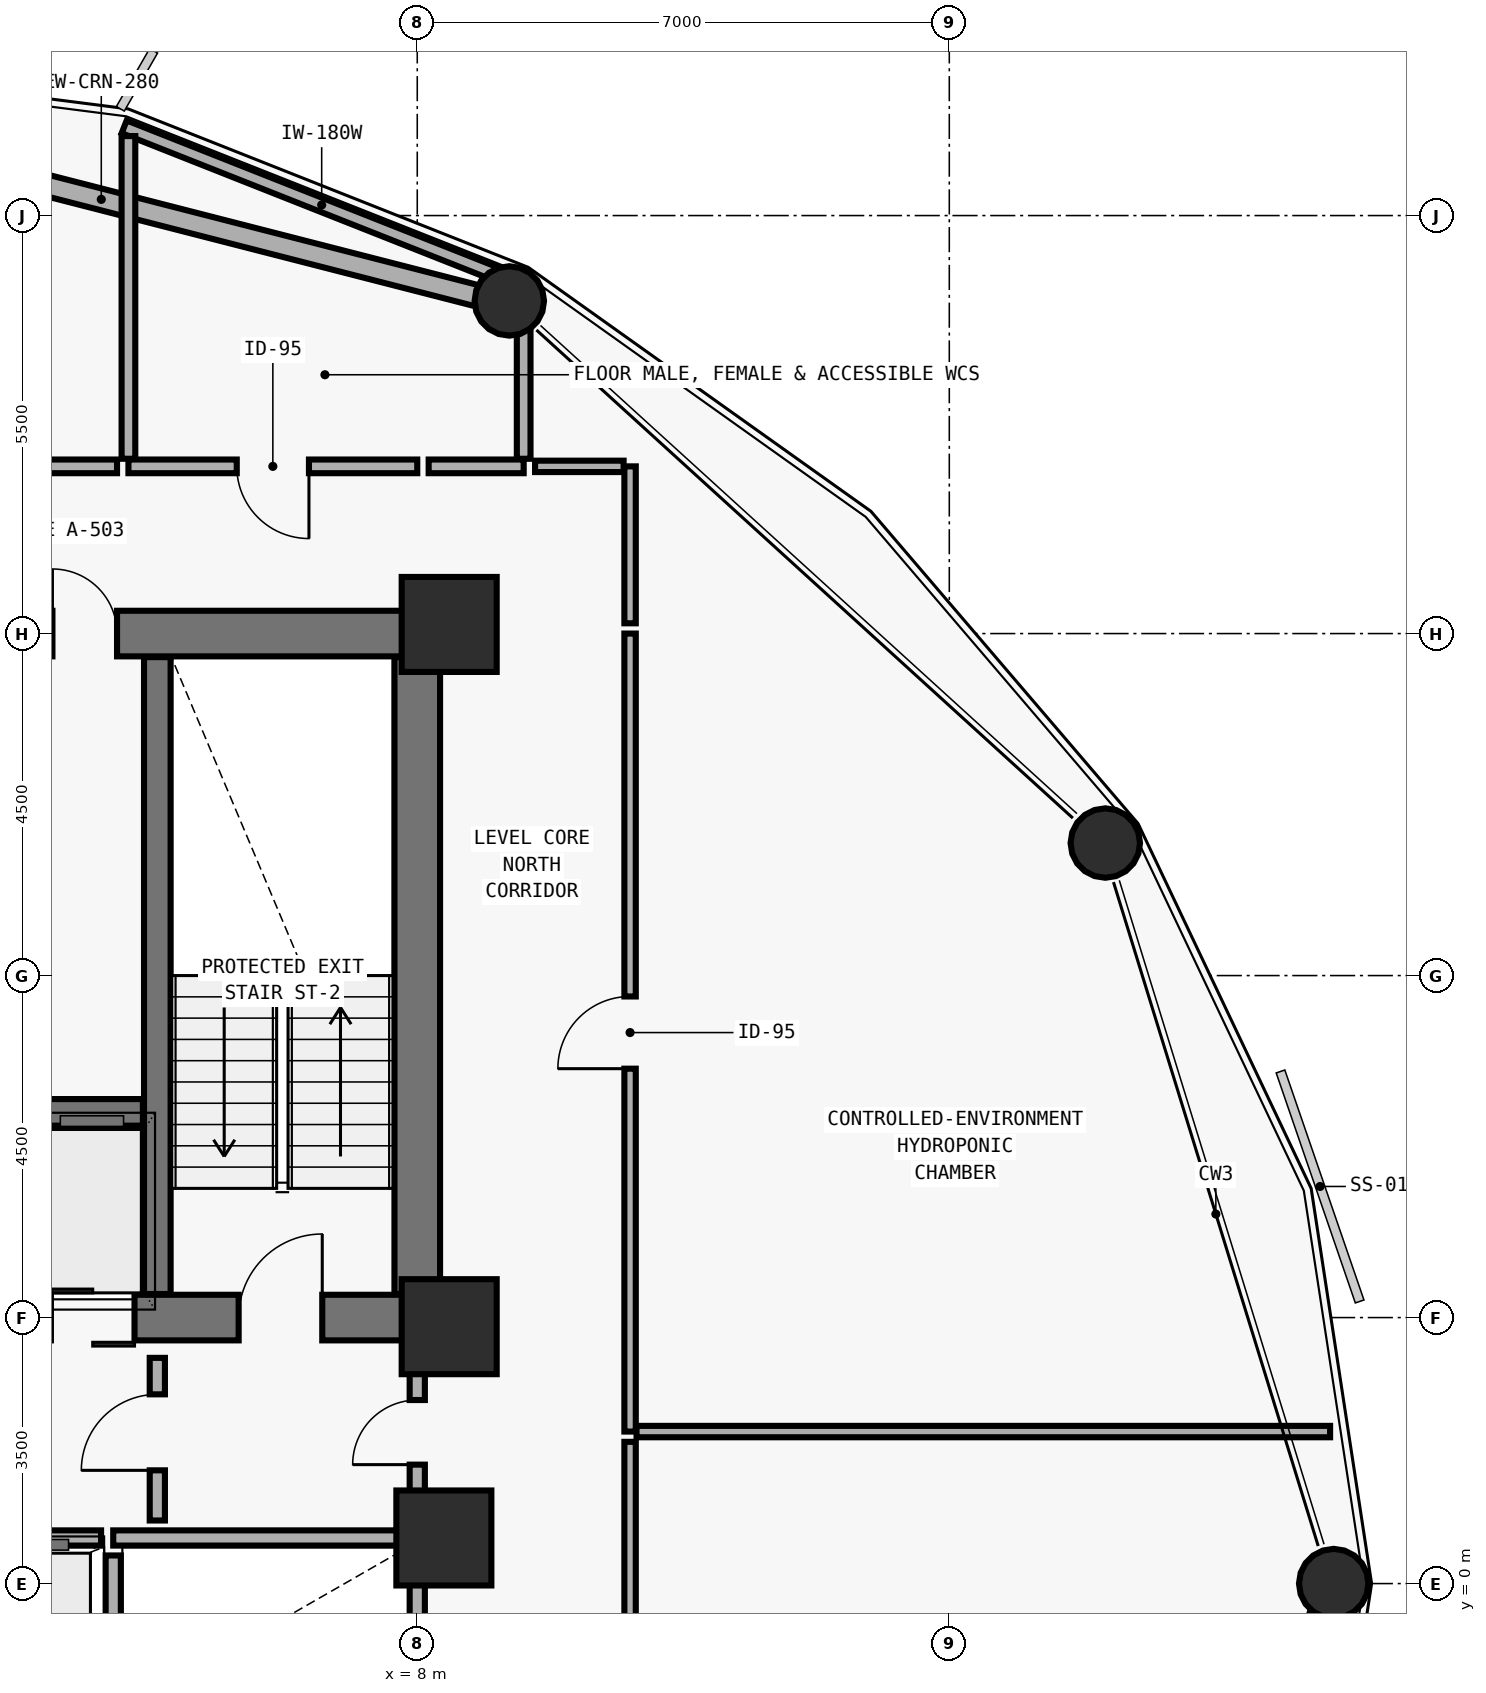
"""IFC4 building model, lengths in metres.
Left out: names, types, materials, properties, quantities, classifications, styles, units other than length and angle.
Written with IfcOpenShell. Run it as: python <this file> out.ifc"""

import sys

from ifc_helpers import new_model, si_unit, direction, frame, frame_2d, origin, origin_2d, place, context, subcontext, project, spatial, rectangle, hollow_circle, extrude, element, fill, save


model = new_model("IFC4")
c1 = context("Model", 3, precision=1e-05, world=origin(), true_north=direction((0.0, 1.0)))
c2 = subcontext(c1, "Body", "Model", "MODEL_VIEW")
j1 = project(units=[si_unit("LENGTHUNIT", "METRE"), si_unit("PLANEANGLEUNIT", "RADIAN")], contexts=[c1])
p1 = place(None, origin())
s1 = spatial("IfcSite", under=j1, at=p1, CompositionType="ELEMENT")
p2 = place(p1, origin())
s2 = spatial("IfcBuilding", under=s1, at=p2, CompositionType="ELEMENT")
p3 = place(p2, frame((0.0, 0.0, 62.7)))
s3 = spatial("IfcBuildingStorey", under=s2, at=p3, CompositionType="ELEMENT", Elevation=62.7)
p4 = place(p3, frame((-2.0, 3.5, 0.0), z_axis=(0.0, 0.0, 1.0), x_axis=(1.0, 0.0, 0.0)))
e1 = element("IfcWall", 1, at=p4, inside=s3, PredefinedType="SHEAR", context=c2, shape_type="SweptSolid", body=[
    extrude(rectangle(XDim=10.0, YDim=0.6, at=frame_2d((5.0, 0.0))), origin(), (0.0, 0.0, 1.0), 3.892),
])
p5 = place(p4, frame((1.65, 0.0, 0.0)))
e2 = element("IfcOpeningElement", 2, at=p5, cuts=e1, PredefinedType="OPENING", context=c2, shape_type="SweptSolid", body=[
    extrude(rectangle(XDim=1.1, YDim=2.15, at=frame_2d((0.55, 1.075))), frame((0.0, 0.31, 0.0), z_axis=(0.0, -1.0, 0.0), x_axis=(1.0, 0.0, 0.0)), (0.0, 0.0, 1.0), 0.62),
])
p6 = place(p4, frame((7.65, 0.0, 0.0)))
e3 = element("IfcOpeningElement", 3, at=p6, cuts=e1, PredefinedType="OPENING", context=c2, shape_type="SweptSolid", body=[
    extrude(rectangle(XDim=1.1, YDim=2.15, at=frame_2d((0.55, 1.075))), frame((0.0, 0.31, 0.0), z_axis=(0.0, -1.0, 0.0), x_axis=(1.0, 0.0, 0.0)), (0.0, 0.0, 1.0), 0.62),
])
p7 = place(p4, frame((3.72, 0.0, 0.0)))
e4 = element("IfcOpeningElement", 4, at=p7, cuts=e1, PredefinedType="OPENING", context=c2, shape_type="SweptSolid", body=[
    extrude(rectangle(XDim=1.1, YDim=2.2, at=frame_2d((0.55, 1.1))), frame((0.0, 0.31, 0.0), z_axis=(0.0, -1.0, 0.0), x_axis=(1.0, 0.0, 0.0)), (0.0, 0.0, 1.0), 0.62),
])
p8 = place(p4, frame((5.18, 0.0, 0.0)))
e5 = element("IfcOpeningElement", 5, at=p8, cuts=e1, PredefinedType="OPENING", context=c2, shape_type="SweptSolid", body=[
    extrude(rectangle(XDim=1.1, YDim=2.2, at=frame_2d((0.55, 1.1))), frame((0.0, 0.31, 0.0), z_axis=(0.0, -1.0, 0.0), x_axis=(1.0, 0.0, 0.0)), (0.0, 0.0, 1.0), 0.62),
])
p9 = place(p3, frame((-2.0, 12.5, 0.0), z_axis=(0.0, 0.0, 1.0), x_axis=(1.0, 0.0, 0.0)))
e6 = element("IfcWall", 6, at=p9, inside=s3, PredefinedType="SHEAR", context=c2, shape_type="SweptSolid", body=[
    extrude(rectangle(XDim=10.0, YDim=0.6, at=frame_2d((5.0, 0.0))), origin(), (0.0, 0.0, 1.0), 3.892),
])
p10 = place(p9, frame((5.2, 0.0, 0.0)))
e7 = element("IfcOpeningElement", 7, at=p10, cuts=e6, PredefinedType="OPENING", context=c2, shape_type="SweptSolid", body=[
    extrude(rectangle(XDim=0.85, YDim=2.1, at=frame_2d((0.425, 1.05))), frame((0.0, 0.31, 0.0), z_axis=(0.0, -1.0, 0.0), x_axis=(1.0, 0.0, 0.0)), (0.0, 0.0, 1.0), 0.62),
])
p11 = place(p3, frame((8.0, 3.81, 0.0), z_axis=(0.0, 0.0, 1.0), x_axis=(0.0, 1.0, 0.0)))
e8 = element("IfcWall", 8, at=p11, inside=s3, PredefinedType="SHEAR", context=c2, shape_type="SweptSolid", body=[
    extrude(rectangle(XDim=8.38, YDim=0.6, at=frame_2d((4.19, 0.0))), origin(), (0.0, 0.0, 1.0), 3.892),
])
p12 = place(p3, frame((4.58, 3.81, 0.0), z_axis=(0.0, 0.0, 1.0), x_axis=(0.0, 1.0, 0.0)))
e9 = element("IfcWall", 9, at=p12, inside=s3, PredefinedType="SHEAR", context=c2, shape_type="SweptSolid", body=[
    extrude(rectangle(XDim=8.38, YDim=0.35, at=frame_2d((4.19, 0.0))), origin(), (0.0, 0.0, 1.0), 3.892),
])
p13 = place(p3, frame((1.61, 6.2, 0.0), z_axis=(0.0, 0.0, 1.0), x_axis=(1.0, 0.0, 0.0)))
e10 = element("IfcWall", 10, at=p13, inside=s3, PredefinedType="SHEAR", context=c2, shape_type="SweptSolid", body=[
    extrude(rectangle(XDim=2.78, YDim=0.35, at=frame_2d((1.39, 0.0))), origin(), (0.0, 0.0, 1.0), 3.892),
])
for number, where, z_axis, x_axis in (
    (11, (8.42, 12.62, 0.0), (0.0, 0.0, 1.0), (1.0, 0.0, 0.0)),
    (12, (8.42, 3.38, 0.0), (0.0, 0.0, 1.0), (1.0, 0.0, 0.0)),
    (13, (8.35, 0.6, 0.0), (0.0, 0.0, 1.0), (1.0, 0.0, 0.0)),
):
    element("IfcColumn", number, at=place(p3, frame(where, z_axis=z_axis, x_axis=x_axis)), inside=s3, PredefinedType="COLUMN", context=c2, shape_type="SweptSolid", body=[
        extrude(rectangle(XDim=1.25, YDim=1.25, at=origin_2d()), origin(), (0.0, 0.0, 1.0), 3.875),
    ])
p14 = place(p3, frame((20.006, 0.0, 0.0), z_axis=(0.026515371649, 0.0, 0.999648405724), x_axis=(0.0, 1.0, 0.0)))
e14 = element("IfcColumn", 14, at=p14, inside=s3, PredefinedType="COLUMN", context=c2, shape_type="SweptSolid", body=[
    extrude(hollow_circle(Radius=0.457, WallThickness=0.032, at=origin_2d()), origin(), (0.0, 0.0, 1.0), 3.876),
])
p15 = place(p3, frame((17.008, 9.724, 0.0), z_axis=(0.022989211418, 0.01014044668, 0.999684283911), x_axis=(-0.403578491135, 0.914945026487, 0.0)))
e15 = element("IfcColumn", 15, at=p15, inside=s3, PredefinedType="COLUMN", context=c2, shape_type="SweptSolid", body=[
    extrude(hollow_circle(Radius=0.457, WallThickness=0.032, at=origin_2d()), origin(), (0.0, 0.0, 1.0), 3.876),
])
p16 = place(p3, frame((9.186, 16.843, 0.0), z_axis=(0.013290608719, 0.017636826737, 0.999756121293), x_axis=(-0.798628839349, 0.601823875366, 0.0)))
e16 = element("IfcColumn", 16, at=p16, inside=s3, PredefinedType="COLUMN", context=c2, shape_type="SweptSolid", body=[
    extrude(hollow_circle(Radius=0.457, WallThickness=0.032, at=origin_2d()), origin(), (0.0, 0.0, 1.0), 3.876),
])
p17 = place(p3, frame((-1.101, 19.481, 0.0), z_axis=(0.0, 0.0, 1.0), x_axis=(0.968647190334, -0.248440376463, 0.0)))
e17 = element("IfcWall", 17, at=p17, inside=s3, PredefinedType="SOLIDWALL", context=c2, shape_type="SweptSolid", body=[
    extrude(rectangle(XDim=10.207, YDim=0.28, at=frame_2d((5.104, 0.0))), origin(), (0.0, 0.0, 1.0), 3.06),
])
p18 = place(p3, frame((19.885, -0.394, 0.0), z_axis=(0.0, 0.0, 1.0), x_axis=(-0.294639825204, -0.95560837868, 0.0)))
e18 = element("IfcWall", 18, at=p18, inside=s3, PredefinedType="SOLIDWALL", context=c2, shape_type="SweptSolid", body=[
    extrude(rectangle(XDim=9.352, YDim=0.28, at=frame_2d((4.676, 0.0))), origin(), (0.0, 0.0, 1.0), 3.06),
])
p19 = place(p3, frame((4.0, 0.6, 0.0), z_axis=(0.0, 0.0, 1.0), x_axis=(1.0, 0.0, 0.0)))
e19 = element("IfcWall", 19, at=p19, inside=s3, PredefinedType="SOLIDWALL", context=c2, shape_type="SweptSolid", body=[
    extrude(rectangle(XDim=3.88, YDim=0.2, at=frame_2d((1.94, 0.0))), origin(), (0.0, 0.0, 1.0), 3.122),
])
p20 = place(p3, frame((4.0, -1.57, 0.0), z_axis=(0.0, 0.0, 1.0), x_axis=(0.0, 1.0, 0.0)))
e20 = element("IfcWall", 20, at=p20, inside=s3, PredefinedType="SOLIDWALL", context=c2, shape_type="SweptSolid", body=[
    extrude(rectangle(XDim=1.94, YDim=0.2, at=frame_2d((0.97, 0.0))), origin(), (0.0, 0.0, 1.0), 3.64),
])
p21 = place(p3, frame((8.0, -1.57, 0.0), z_axis=(0.0, 0.0, 1.0), x_axis=(0.0, 1.0, 0.0)))
e21 = element("IfcWall", 21, at=p21, inside=s3, PredefinedType="SOLIDWALL", context=c2, shape_type="SweptSolid", body=[
    extrude(rectangle(XDim=2.05, YDim=0.2, at=frame_2d((1.025, 0.0))), origin(), (0.0, 0.0, 1.0), 3.072),
])
p22 = place(p3, frame((4.58, 0.83, 0.0), z_axis=(0.0, 0.0, 1.0), x_axis=(0.0, 1.0, 0.0)))
e22 = element("IfcWall", 22, at=p22, inside=s3, PredefinedType="MOVABLE", context=c2, shape_type="SweptSolid", body=[
    extrude(rectangle(XDim=2.14, YDim=0.2, at=frame_2d((1.07, 0.0))), origin(), (0.0, 0.0, 1.0), 3.64),
])
p23 = place(p22, frame((0.66, 0.0, 0.0)))
e23 = element("IfcOpeningElement", 23, at=p23, cuts=e22, PredefinedType="OPENING", context=c2, shape_type="SweptSolid", body=[
    extrude(rectangle(XDim=1.0, YDim=2.1, at=frame_2d((0.5, 1.05))), frame((0.0, 0.11, 0.0), z_axis=(0.0, -1.0, 0.0), x_axis=(1.0, 0.0, 0.0)), (0.0, 0.0, 1.0), 0.22),
])
p24 = place(p3, frame((8.0, 0.72, 0.0), z_axis=(0.0, 0.0, 1.0), x_axis=(0.0, 1.0, 0.0)))
e24 = element("IfcWall", 24, at=p24, inside=s3, PredefinedType="MOVABLE", context=c2, shape_type="SweptSolid", body=[
    extrude(rectangle(XDim=2.25, YDim=0.2, at=frame_2d((1.125, 0.0))), origin(), (0.0, 0.0, 1.0), 2.872),
])
p25 = place(p24, frame((0.845, 0.0, 0.0)))
e25 = element("IfcOpeningElement", 25, at=p25, cuts=e24, PredefinedType="OPENING", context=c2, shape_type="SweptSolid", body=[
    extrude(rectangle(XDim=0.85, YDim=2.1, at=frame_2d((0.425, 1.05))), frame((0.0, 0.11, 0.0), z_axis=(0.0, -1.0, 0.0), x_axis=(1.0, 0.0, 0.0)), (0.0, 0.0, 1.0), 0.22),
])
p26 = place(p3, frame((8.0, 14.7, 0.0), z_axis=(0.0, 0.0, 1.0), x_axis=(-1.0, 0.0, 0.0)))
e26 = element("IfcWall", 26, at=p26, inside=s3, PredefinedType="PLUMBINGWALL", context=c2, shape_type="SweptSolid", body=[
    extrude(rectangle(XDim=3.8, YDim=0.18, at=frame_2d((1.9, 0.0))), origin(), (0.0, 0.0, 1.0), 3.122),
])
p27 = place(p26, frame((1.425, 0.0, 0.0)))
e27 = element("IfcOpeningElement", 27, at=p27, cuts=e26, PredefinedType="OPENING", context=c2, shape_type="SweptSolid", body=[
    extrude(rectangle(XDim=0.95, YDim=2.1, at=frame_2d((0.475, 1.05))), frame((0.0, 0.1, 0.0), z_axis=(0.0, -1.0, 0.0), x_axis=(1.0, 0.0, 0.0)), (0.0, 0.0, 1.0), 0.2),
])
p28 = place(p3, frame((10.8, 2.0, 0.0), z_axis=(0.0, 0.0, 1.0), x_axis=(0.0, 1.0, 0.0)))
e28 = element("IfcWall", 28, at=p28, inside=s3, PredefinedType="PARTITIONING", context=c2, shape_type="SweptSolid", body=[
    extrude(rectangle(XDim=10.5, YDim=0.15, at=frame_2d((5.25, 0.0))), origin(), (0.0, 0.0, 1.0), 3.64),
])
p29 = place(p28, frame((4.775, 0.0, 0.0)))
e29 = element("IfcOpeningElement", 29, at=p29, cuts=e28, PredefinedType="OPENING", context=c2, shape_type="SweptSolid", body=[
    extrude(rectangle(XDim=0.95, YDim=2.1, at=frame_2d((0.475, 1.05))), frame((0.0, 0.085, 0.0), z_axis=(0.0, -1.0, 0.0), x_axis=(1.0, 0.0, 0.0)), (0.0, 0.0, 1.0), 0.17),
])
p30 = place(p3, frame((-1.88, 0.6, 0.0), z_axis=(0.0, 0.0, 1.0), x_axis=(1.0, 0.0, 0.0)))
e30 = element("IfcWall", 30, at=p30, inside=s3, PredefinedType="MOVABLE", context=c2, shape_type="SweptSolid", body=[
    extrude(rectangle(XDim=5.72, YDim=0.2, at=frame_2d((2.86, 0.0))), origin(), (0.0, 0.0, 1.0), 3.122),
])
p31 = place(p3, frame((9.4, 14.7, 0.0), z_axis=(0.0, 0.0, 1.0), x_axis=(-1.0, 0.0, 0.0)))
e31 = element("IfcWall", 31, at=p31, inside=s3, PredefinedType="PLUMBINGWALL", context=c2, shape_type="SweptSolid", body=[
    extrude(rectangle(XDim=1.25, YDim=0.18, at=frame_2d((0.625, 0.0))), origin(), (0.0, 0.0, 1.0), 3.122),
])
p32 = place(p3, frame((4.05, 14.7, 0.0), z_axis=(0.0, 0.0, 1.0), x_axis=(-1.0, 0.0, 0.0)))
e32 = element("IfcWall", 32, at=p32, inside=s3, PredefinedType="PLUMBINGWALL", context=c2, shape_type="SweptSolid", body=[
    extrude(rectangle(XDim=2.74, YDim=0.18, at=frame_2d((1.37, 0.0))), origin(), (0.0, 0.0, 1.0), 3.122),
])
p33 = place(p3, frame((4.144, 19.168, 0.0), z_axis=(0.0, 0.0, 1.0), x_axis=(0.929823117235, -0.368006753545, 0.0)))
e33 = element("IfcWall", 33, at=p33, inside=s3, PredefinedType="PLUMBINGWALL", context=c2, shape_type="SweptSolid", body=[
    extrude(rectangle(XDim=5.589, YDim=0.18, at=frame_2d((2.795, 0.0))), origin(), (0.0, 0.0, 1.0), 3.072),
])
p34 = place(p3, frame((4.2, 19.046, 0.0), z_axis=(0.0, 0.0, 1.0), x_axis=(0.0, -1.0, 0.0)))
e34 = element("IfcWall", 34, at=p34, inside=s3, PredefinedType="PLUMBINGWALL", context=c2, shape_type="SweptSolid", body=[
    extrude(rectangle(XDim=4.246, YDim=0.18, at=frame_2d((2.123, 0.0))), origin(), (0.0, 0.0, 1.0), 3.64),
])
p35 = place(p3, frame((10.8, -1.69, 0.0), z_axis=(0.0, 0.0, 1.0), x_axis=(0.0, 1.0, 0.0)))
e35 = element("IfcWall", 35, at=p35, inside=s3, PredefinedType="PARTITIONING", context=c2, shape_type="SweptSolid", body=[
    extrude(rectangle(XDim=3.555, YDim=0.15, at=frame_2d((1.777, 0.0))), origin(), (0.0, 0.0, 1.0), 3.64),
])
p36 = place(p3, frame((10.885, 2.0, 0.0), z_axis=(0.0, 0.0, 1.0), x_axis=(1.0, 0.0, 0.0)))
e36 = element("IfcWall", 36, at=p36, inside=s3, PredefinedType="PARTITIONING", context=c2, shape_type="SweptSolid", body=[
    extrude(rectangle(XDim=9.125, YDim=0.15, at=frame_2d((4.562, 0.0))), origin(), (0.0, 0.0, 1.0), 3.64),
])
p37 = place(p3, frame((10.8, 12.635, 0.0), z_axis=(0.0, 0.0, 1.0), x_axis=(0.0, 1.0, 0.0)))
e37 = element("IfcWall", 37, at=p37, inside=s3, PredefinedType="PARTITIONING", context=c2, shape_type="SweptSolid", body=[
    extrude(rectangle(XDim=2.065, YDim=0.15, at=frame_2d((1.032, 0.0))), origin(), (0.0, 0.0, 1.0), 3.64),
])
p38 = place(p3, frame((10.715, 14.7, 0.0), z_axis=(0.0, 0.0, 1.0), x_axis=(-1.0, 0.0, 0.0)))
e38 = element("IfcWall", 38, at=p38, inside=s3, PredefinedType="PARTITIONING", context=c2, shape_type="SweptSolid", body=[
    extrude(rectangle(XDim=1.165, YDim=0.15, at=frame_2d((0.583, 0.0))), origin(), (0.0, 0.0, 1.0), 3.64),
])
p39 = place(p3, frame((9.4, 14.8, 0.0), z_axis=(0.0, 0.0, 1.0), x_axis=(0.0, 1.0, 0.0)))
e39 = element("IfcWall", 39, at=p39, inside=s3, PredefinedType="PLUMBINGWALL", context=c2, shape_type="SweptSolid", body=[
    extrude(rectangle(XDim=2.169, YDim=0.18, at=frame_2d((1.084, 0.0))), origin(), (0.0, 0.0, 1.0), 2.972),
])
p40 = place(p6, origin())
e40 = element("IfcDoor", 40, at=p40, inside=s3, OperationType="SINGLE_SWING_RIGHT", PredefinedType="DOOR", context=c2, shape_type="SweptSolid", body=[
    extrude(rectangle(XDim=1.1, YDim=2.15, at=frame_2d((0.55, 1.075))), frame((0.0, 0.025, 0.0), z_axis=(0.0, -1.0, 0.0), x_axis=(1.0, 0.0, 0.0)), (0.0, 0.0, 1.0), 0.05),
])
fill(e3, e40)
p41 = place(p8, origin())
e41 = element("IfcDoor", 41, at=p41, inside=s3, OperationType="DOUBLE_DOOR_SLIDING", PredefinedType="DOOR", context=c2, shape_type="SweptSolid", body=[
    extrude(rectangle(XDim=1.1, YDim=2.2, at=frame_2d((0.55, 1.1))), frame((0.0, 0.025, 0.0), z_axis=(0.0, -1.0, 0.0), x_axis=(1.0, 0.0, 0.0)), (0.0, 0.0, 1.0), 0.05),
])
fill(e5, e41)
p42 = place(p10, origin())
e42 = element("IfcDoor", 42, at=p42, inside=s3, OperationType="SINGLE_SWING_LEFT", PredefinedType="DOOR", context=c2, shape_type="SweptSolid", body=[
    extrude(rectangle(XDim=0.85, YDim=2.1, at=frame_2d((0.425, 1.05))), frame((0.0, 0.025, 0.0), z_axis=(0.0, -1.0, 0.0), x_axis=(1.0, 0.0, 0.0)), (0.0, 0.0, 1.0), 0.05),
])
fill(e7, e42)
p43 = place(p23, origin())
e43 = element("IfcDoor", 43, at=p43, inside=s3, OperationType="SINGLE_SWING_LEFT", PredefinedType="DOOR", context=c2, shape_type="SweptSolid", body=[
    extrude(rectangle(XDim=1.0, YDim=2.1, at=frame_2d((0.5, 1.05))), frame((0.0, 0.025, 0.0), z_axis=(0.0, -1.0, 0.0), x_axis=(1.0, 0.0, 0.0)), (0.0, 0.0, 1.0), 0.05),
])
fill(e23, e43)
p44 = place(p25, origin())
e44 = element("IfcDoor", 44, at=p44, inside=s3, OperationType="SINGLE_SWING_LEFT", PredefinedType="DOOR", context=c2, shape_type="SweptSolid", body=[
    extrude(rectangle(XDim=0.85, YDim=2.1, at=frame_2d((0.425, 1.05))), frame((0.0, 0.025, 0.0), z_axis=(0.0, -1.0, 0.0), x_axis=(1.0, 0.0, 0.0)), (0.0, 0.0, 1.0), 0.05),
])
fill(e25, e44)
p45 = place(p27, origin())
e45 = element("IfcDoor", 45, at=p45, inside=s3, OperationType="SINGLE_SWING_LEFT", PredefinedType="DOOR", context=c2, shape_type="SweptSolid", body=[
    extrude(rectangle(XDim=0.95, YDim=2.1, at=frame_2d((0.475, 1.05))), frame((0.0, 0.025, 0.0), z_axis=(0.0, -1.0, 0.0), x_axis=(1.0, 0.0, 0.0)), (0.0, 0.0, 1.0), 0.05),
])
fill(e27, e45)
p46 = place(p29, origin())
e46 = element("IfcDoor", 46, at=p46, inside=s3, OperationType="SINGLE_SWING_LEFT", PredefinedType="DOOR", context=c2, shape_type="SweptSolid", body=[
    extrude(rectangle(XDim=0.95, YDim=2.1, at=frame_2d((0.475, 1.05))), frame((0.0, 0.025, 0.0), z_axis=(0.0, -1.0, 0.0), x_axis=(1.0, 0.0, 0.0)), (0.0, 0.0, 1.0), 0.05),
])
fill(e29, e46)
save(model, sys.argv[1])
